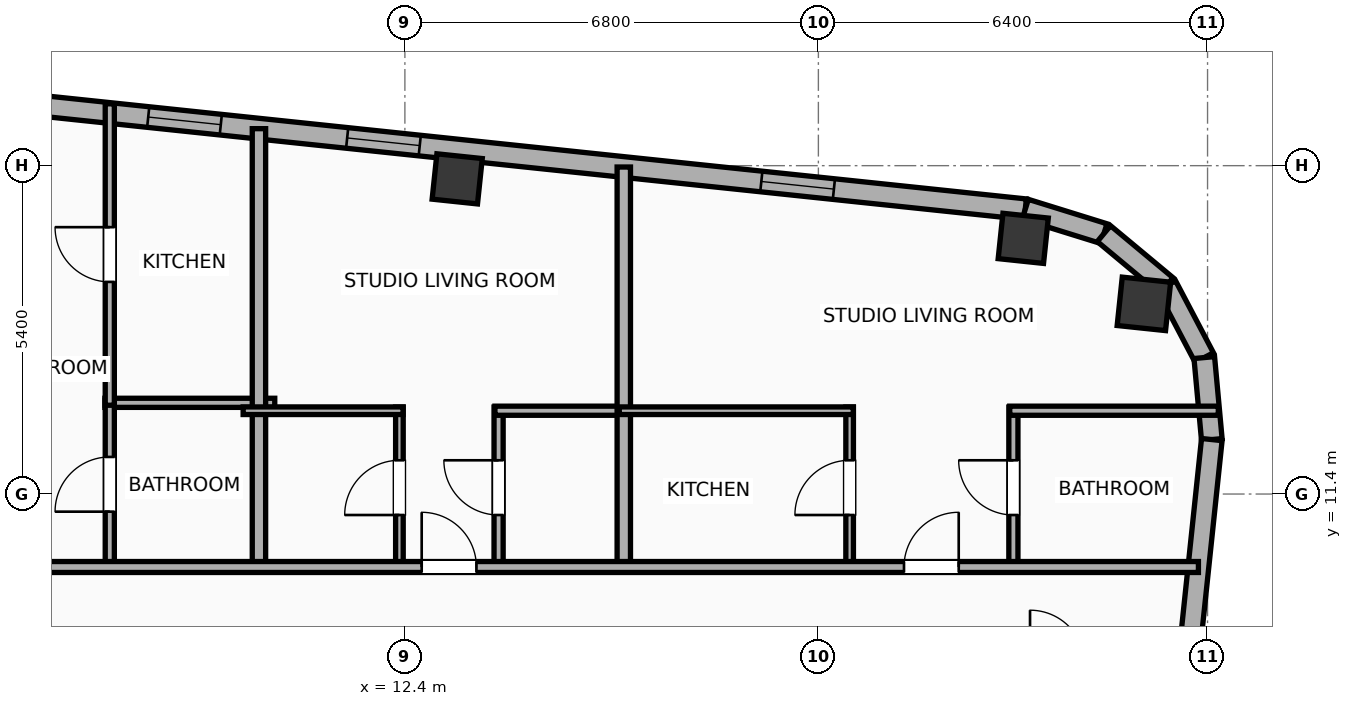
"""IFC4 building model, lengths in metres.
Left out: names, types, materials, properties, quantities, classifications, styles, units other than length and angle.
Written with IfcOpenShell. Run it as: python <this file> out.ifc"""

import sys

from ifc_helpers import new_model, si_unit, direction, frame, frame_2d, origin, origin_2d, place, context, subcontext, project, spatial, rectangle, hollow_rectangle, hollow_circle, extrude, element, fill, save


model = new_model("IFC4")
c1 = context("Model", 3, precision=1e-05, world=origin(), true_north=direction((0.0, 1.0)))
c2 = subcontext(c1, "Body", "Model", "MODEL_VIEW")
j1 = project(units=[si_unit("LENGTHUNIT", "METRE"), si_unit("PLANEANGLEUNIT", "RADIAN")], contexts=[c1])
p1 = place(None, origin())
s1 = spatial("IfcSite", under=j1, at=p1, CompositionType="ELEMENT")
p2 = place(p1, origin())
s2 = spatial("IfcBuilding", under=s1, at=p2, CompositionType="ELEMENT")
p3 = place(p2, frame((0.0, 0.0, 295.1)))
s3 = spatial("IfcBuildingStorey", under=s2, at=p3, CompositionType="ELEMENT", Elevation=295.1)
p4 = place(p3, frame((24.553, 14.527, 0.0), z_axis=(0.0, 0.0, 1.0), x_axis=(0.994521895368, -0.104528463268, 0.0)))
e1 = element("IfcColumn", 1, at=p4, inside=s3, PredefinedType="COLUMN", context=c2, shape_type="SweptSolid", body=[
    extrude(hollow_circle(Radius=0.4, WallThickness=0.028, at=origin_2d()), origin(), (0.0, 0.0, 1.0), 3.9),
])
for number, where, z_axis, x_axis in (
    (2, (22.569, 15.604, 0.0), (0.0, 0.0, 1.0), (0.995, -0.105, 0.0)),
    (3, (13.26, 16.583, 0.0), (0.0, 0.0, 1.0), (0.995, -0.105, 0.0)),
):
    element("IfcColumn", number, at=place(p3, frame(where, z_axis=z_axis, x_axis=x_axis)), inside=s3, PredefinedType="COLUMN", context=c2, shape_type="SweptSolid", body=[
        extrude(hollow_rectangle(XDim=0.75, YDim=0.75, WallThickness=0.025, at=origin_2d()), origin(), (0.0, 0.0, 1.0), 3.9),
    ])
p5 = place(p3, frame((-23.908, 20.972, 0.0), z_axis=(0.0, 0.0, 1.0), x_axis=(0.994521888554, -0.104528528102, 0.0)))
e4 = element("IfcWall", 4, at=p5, inside=s3, PredefinedType="ELEMENTEDWALL", context=c2, shape_type="SweptSolid", body=[
    extrude(rectangle(XDim=46.766, YDim=0.34, at=frame_2d((23.383, 0.0))), origin(), (0.0, 0.0, 1.0), 3.635),
])
p6 = place(p5, frame((22.933, 0.0, 0.65)))
e5 = element("IfcOpeningElement", 5, at=p6, cuts=e4, PredefinedType="OPENING", context=c2, shape_type="SweptSolid", body=[
    extrude(rectangle(XDim=2.6, YDim=2.45, at=frame_2d((1.3, 1.225))), frame((0.0, 0.18, 0.0), z_axis=(0.0, -1.0, 0.0), x_axis=(1.0, 0.0, 0.0)), (0.0, 0.0, 1.0), 0.36),
])
p7 = place(p5, frame((1.812, 0.0, 0.75)))
e6 = element("IfcOpeningElement", 6, at=p7, cuts=e4, PredefinedType="OPENING", context=c2, shape_type="SweptSolid", body=[
    extrude(rectangle(XDim=1.2, YDim=2.05, at=frame_2d((0.6, 1.025))), frame((0.0, 0.18, 0.0), z_axis=(0.0, -1.0, 0.0), x_axis=(1.0, 0.0, 0.0)), (0.0, 0.0, 1.0), 0.36),
])
p8 = place(p5, frame((7.481, 0.0, 0.75)))
e7 = element("IfcOpeningElement", 7, at=p8, cuts=e4, PredefinedType="OPENING", context=c2, shape_type="SweptSolid", body=[
    extrude(rectangle(XDim=1.2, YDim=2.05, at=frame_2d((0.6, 1.025))), frame((0.0, 0.18, 0.0), z_axis=(0.0, -1.0, 0.0), x_axis=(1.0, 0.0, 0.0)), (0.0, 0.0, 1.0), 0.36),
])
p9 = place(p5, frame((4.464, 0.0, 0.75)))
e8 = element("IfcOpeningElement", 8, at=p9, cuts=e4, PredefinedType="OPENING", context=c2, shape_type="SweptSolid", body=[
    extrude(rectangle(XDim=1.2, YDim=2.05, at=frame_2d((0.6, 1.025))), frame((0.0, 0.18, 0.0), z_axis=(0.0, -1.0, 0.0), x_axis=(1.0, 0.0, 0.0)), (0.0, 0.0, 1.0), 0.36),
])
p10 = place(p5, frame((13.665, 0.0, 0.75)))
e9 = element("IfcOpeningElement", 9, at=p10, cuts=e4, PredefinedType="OPENING", context=c2, shape_type="SweptSolid", body=[
    extrude(rectangle(XDim=1.2, YDim=2.05, at=frame_2d((0.6, 1.025))), frame((0.0, 0.18, 0.0), z_axis=(0.0, -1.0, 0.0), x_axis=(1.0, 0.0, 0.0)), (0.0, 0.0, 1.0), 0.36),
])
p11 = place(p5, frame((10.648, 0.0, 0.75)))
e10 = element("IfcOpeningElement", 10, at=p11, cuts=e4, PredefinedType="OPENING", context=c2, shape_type="SweptSolid", body=[
    extrude(rectangle(XDim=1.2, YDim=2.05, at=frame_2d((0.6, 1.025))), frame((0.0, 0.18, 0.0), z_axis=(0.0, -1.0, 0.0), x_axis=(1.0, 0.0, 0.0)), (0.0, 0.0, 1.0), 0.36),
])
p12 = place(p5, frame((19.254, 0.0, 0.75)))
e11 = element("IfcOpeningElement", 11, at=p12, cuts=e4, PredefinedType="OPENING", context=c2, shape_type="SweptSolid", body=[
    extrude(rectangle(XDim=1.2, YDim=2.05, at=frame_2d((0.6, 1.025))), frame((0.0, 0.18, 0.0), z_axis=(0.0, -1.0, 0.0), x_axis=(1.0, 0.0, 0.0)), (0.0, 0.0, 1.0), 0.36),
])
p13 = place(p5, frame((29.247, 0.0, 0.75)))
e12 = element("IfcOpeningElement", 12, at=p13, cuts=e4, PredefinedType="OPENING", context=c2, shape_type="SweptSolid", body=[
    extrude(rectangle(XDim=1.2, YDim=2.05, at=frame_2d((0.6, 1.025))), frame((0.0, 0.18, 0.0), z_axis=(0.0, -1.0, 0.0), x_axis=(1.0, 0.0, 0.0)), (0.0, 0.0, 1.0), 0.36),
])
p14 = place(p5, frame((32.264, 0.0, 0.75)))
e13 = element("IfcOpeningElement", 13, at=p14, cuts=e4, PredefinedType="OPENING", context=c2, shape_type="SweptSolid", body=[
    extrude(rectangle(XDim=1.2, YDim=2.05, at=frame_2d((0.6, 1.025))), frame((0.0, 0.18, 0.0), z_axis=(0.0, -1.0, 0.0), x_axis=(1.0, 0.0, 0.0)), (0.0, 0.0, 1.0), 0.36),
])
p15 = place(p5, frame((35.553, 0.0, 0.75)))
e14 = element("IfcOpeningElement", 14, at=p15, cuts=e4, PredefinedType="OPENING", context=c2, shape_type="SweptSolid", body=[
    extrude(rectangle(XDim=1.2, YDim=2.05, at=frame_2d((0.6, 1.025))), frame((0.0, 0.18, 0.0), z_axis=(0.0, -1.0, 0.0), x_axis=(1.0, 0.0, 0.0)), (0.0, 0.0, 1.0), 0.36),
])
p16 = place(p5, frame((42.402, 0.0, 0.75)))
e15 = element("IfcOpeningElement", 15, at=p16, cuts=e4, PredefinedType="OPENING", context=c2, shape_type="SweptSolid", body=[
    extrude(rectangle(XDim=1.2, YDim=2.05, at=frame_2d((0.6, 1.025))), frame((0.0, 0.18, 0.0), z_axis=(0.0, -1.0, 0.0), x_axis=(1.0, 0.0, 0.0)), (0.0, 0.0, 1.0), 0.36),
])
p17 = place(p3, frame((22.603, 16.084, 0.0), z_axis=(0.0, 0.0, 1.0), x_axis=(0.955007802701, -0.296580674994, 0.0)))
e16 = element("IfcWall", 16, at=p17, inside=s3, PredefinedType="ELEMENTEDWALL", context=c2, shape_type="SweptSolid", body=[
    extrude(rectangle(XDim=1.354, YDim=0.34, at=frame_2d((0.677, 0.0))), origin(), (0.0, 0.0, 1.0), 3.635),
])
for number, where, z_axis, x_axis in (
    (17, (23.896, 15.682, 0.0), (0.0, 0.0, 1.0), (0.769, -0.64, 0.0)),
    (18, (24.924, 14.827, 0.0), (0.0, 0.0, 1.0), (0.466, -0.885, 0.0)),
):
    element("IfcWall", number, at=place(p3, frame(where, z_axis=z_axis, x_axis=x_axis)), inside=s3, PredefinedType="ELEMENTEDWALL", context=c2, shape_type="SweptSolid", body=[
        extrude(rectangle(XDim=1.337, YDim=0.34, at=frame_2d((0.668, 0.0))), origin(), (0.0, 0.0, 1.0), 3.635),
    ])
p18 = place(p3, frame((25.546, 13.644, 0.0), z_axis=(0.0, 0.0, 1.0), x_axis=(0.091592370975, -0.995796584438, 0.0)))
e19 = element("IfcWall", 19, at=p18, inside=s3, PredefinedType="ELEMENTEDWALL", context=c2, shape_type="SweptSolid", body=[
    extrude(rectangle(XDim=1.354, YDim=0.34, at=frame_2d((0.677, 0.0))), origin(), (0.0, 0.0, 1.0), 3.635),
])
p19 = place(p3, frame((25.67, 12.296, 0.0), z_axis=(0.0, 0.0, 1.0), x_axis=(-0.104533282919, -0.994521388791, 0.0)))
e20 = element("IfcWall", 20, at=p19, inside=s3, PredefinedType="ELEMENTEDWALL", context=c2, shape_type="SweptSolid", body=[
    extrude(rectangle(XDim=30.366, YDim=0.34, at=frame_2d((15.183, 0.0))), origin(), (0.0, 0.0, 1.0), 3.635),
])
p20 = place(p19, frame((5.442, 0.0, 0.65)))
e21 = element("IfcOpeningElement", 21, at=p20, cuts=e20, PredefinedType="OPENING", context=c2, shape_type="SweptSolid", body=[
    extrude(rectangle(XDim=2.6, YDim=2.45, at=frame_2d((1.3, 1.225))), frame((0.0, 0.18, 0.0), z_axis=(0.0, -1.0, 0.0), x_axis=(1.0, 0.0, 0.0)), (0.0, 0.0, 1.0), 0.36),
])
p21 = place(p19, frame((27.067, 0.0, 0.75)))
e22 = element("IfcOpeningElement", 22, at=p21, cuts=e20, PredefinedType="OPENING", context=c2, shape_type="SweptSolid", body=[
    extrude(rectangle(XDim=1.2, YDim=2.05, at=frame_2d((0.6, 1.025))), frame((0.0, 0.18, 0.0), z_axis=(0.0, -1.0, 0.0), x_axis=(1.0, 0.0, 0.0)), (0.0, 0.0, 1.0), 0.36),
])
p22 = place(p19, frame((17.879, 0.0, 0.75)))
e23 = element("IfcOpeningElement", 23, at=p22, cuts=e20, PredefinedType="OPENING", context=c2, shape_type="SweptSolid", body=[
    extrude(rectangle(XDim=1.2, YDim=2.05, at=frame_2d((0.6, 1.025))), frame((0.0, 0.18, 0.0), z_axis=(0.0, -1.0, 0.0), x_axis=(1.0, 0.0, 0.0)), (0.0, 0.0, 1.0), 0.36),
])
p23 = place(p3, frame((7.467, 12.9, 0.0), z_axis=(0.0, 0.0, 1.0), x_axis=(1.0, 0.0, 0.0)))
e24 = element("IfcWall", 24, at=p23, inside=s3, PredefinedType="PLUMBINGWALL", context=c2, shape_type="SweptSolid", body=[
    extrude(rectangle(XDim=2.793, YDim=0.15, at=frame_2d((1.396, 0.0))), origin(), (0.0, 0.0, 1.0), 3.635),
])
p24 = place(p3, frame((7.547, 10.18, 0.0), z_axis=(0.0, 0.0, 1.0), x_axis=(0.0, 1.0, 0.0)))
e25 = element("IfcWall", 25, at=p24, inside=s3, PredefinedType="PLUMBINGWALL", context=c2, shape_type="SweptSolid", body=[
    extrude(rectangle(XDim=2.76, YDim=0.15, at=frame_2d((1.38, 0.0))), origin(), (0.0, 0.0, 1.0), 3.635),
])
p25 = place(p24, frame((0.93, 0.0, 0.0)))
e26 = element("IfcOpeningElement", 26, at=p25, cuts=e25, PredefinedType="OPENING", context=c2, shape_type="SweptSolid", body=[
    extrude(rectangle(XDim=0.9, YDim=2.05, at=frame_2d((0.45, 1.025))), frame((0.0, 0.085, 0.0), z_axis=(0.0, -1.0, 0.0), x_axis=(1.0, 0.0, 0.0)), (0.0, 0.0, 1.0), 0.17),
])
p26 = place(p3, frame((7.547, 12.86, 0.0), z_axis=(0.0, 0.0, 1.0), x_axis=(0.0, 1.0, 0.0)))
e27 = element("IfcWall", 27, at=p26, inside=s3, PredefinedType="PLUMBINGWALL", context=c2, shape_type="SweptSolid", body=[
    extrude(rectangle(XDim=4.957, YDim=0.15, at=frame_2d((2.479, 0.0))), origin(), (0.0, 0.0, 1.0), 3.635),
])
p27 = place(p26, frame((2.029, 0.0, 0.0)))
e28 = element("IfcOpeningElement", 28, at=p27, cuts=e27, PredefinedType="OPENING", context=c2, shape_type="SweptSolid", body=[
    extrude(rectangle(XDim=0.9, YDim=2.05, at=frame_2d((0.45, 1.025))), frame((0.0, 0.085, 0.0), z_axis=(0.0, -1.0, 0.0), x_axis=(1.0, 0.0, 0.0)), (0.0, 0.0, 1.0), 0.17),
])
p28 = place(p3, frame((10.0, 10.12, 0.0), z_axis=(0.0, 0.0, 1.0), x_axis=(0.0, 1.0, 0.0)))
e29 = element("IfcWall", 29, at=p28, inside=s3, PredefinedType="PARTITIONING", context=c2, shape_type="SweptSolid", body=[
    extrude(rectangle(XDim=7.288, YDim=0.22, at=frame_2d((3.644, 0.0))), origin(), (0.0, 0.0, 1.0), 3.635),
])
p29 = place(p3, frame((12.31, 10.18, 0.0), z_axis=(0.0, 0.0, 1.0), x_axis=(0.0, 1.0, 0.0)))
e30 = element("IfcWall", 30, at=p29, inside=s3, PredefinedType="PARTITIONING", context=c2, shape_type="SweptSolid", body=[
    extrude(rectangle(XDim=2.65, YDim=0.125, at=frame_2d((1.325, 0.0))), origin(), (0.0, 0.0, 1.0), 3.635),
])
p30 = place(p29, frame((0.875, 0.0, 0.0)))
e31 = element("IfcOpeningElement", 31, at=p30, cuts=e30, PredefinedType="OPENING", context=c2, shape_type="SweptSolid", body=[
    extrude(rectangle(XDim=0.9, YDim=2.05, at=frame_2d((0.45, 1.025))), frame((0.0, 0.073, 0.0), z_axis=(0.0, -1.0, 0.0), x_axis=(1.0, 0.0, 0.0)), (0.0, 0.0, 1.0), 0.145),
])
p31 = place(p3, frame((13.941, 10.18, 0.0), z_axis=(0.0, 0.0, 1.0), x_axis=(0.0, 1.0, 0.0)))
e32 = element("IfcWall", 32, at=p31, inside=s3, PredefinedType="PLUMBINGWALL", context=c2, shape_type="SweptSolid", body=[
    extrude(rectangle(XDim=2.65, YDim=0.15, at=frame_2d((1.325, 0.0))), origin(), (0.0, 0.0, 1.0), 3.635),
])
p32 = place(p31, frame((0.875, 0.0, 0.0)))
e33 = element("IfcOpeningElement", 33, at=p32, cuts=e32, PredefinedType="OPENING", context=c2, shape_type="SweptSolid", body=[
    extrude(rectangle(XDim=0.9, YDim=2.05, at=frame_2d((0.45, 1.025))), frame((0.0, 0.085, 0.0), z_axis=(0.0, -1.0, 0.0), x_axis=(1.0, 0.0, 0.0)), (0.0, 0.0, 1.0), 0.17),
])
p33 = place(p3, frame((9.74, 12.77, 0.0), z_axis=(0.0, 0.0, 1.0), x_axis=(1.0, 0.0, 0.0)))
e34 = element("IfcWall", 34, at=p33, inside=s3, PredefinedType="PARTITIONING", context=c2, shape_type="SweptSolid", body=[
    extrude(rectangle(XDim=2.63, YDim=0.125, at=frame_2d((1.315, 0.0))), origin(), (0.0, 0.0, 1.0), 3.635),
])
p34 = place(p3, frame((13.881, 12.77, 0.0), z_axis=(0.0, 0.0, 1.0), x_axis=(1.0, 0.0, 0.0)))
e35 = element("IfcWall", 35, at=p34, inside=s3, PredefinedType="PLUMBINGWALL", context=c2, shape_type="SweptSolid", body=[
    extrude(rectangle(XDim=2.194, YDim=0.15, at=frame_2d((1.097, 0.0))), origin(), (0.0, 0.0, 1.0), 3.635),
])
p35 = place(p3, frame((16.0, 10.12, 0.0), z_axis=(0.0, 0.0, 1.0), x_axis=(0.0, 1.0, 0.0)))
e36 = element("IfcWall", 36, at=p35, inside=s3, PredefinedType="PARTITIONING", context=c2, shape_type="SweptSolid", body=[
    extrude(rectangle(XDim=6.657, YDim=0.22, at=frame_2d((3.329, 0.0))), origin(), (0.0, 0.0, 1.0), 3.635),
])
p36 = place(p3, frame((19.714, 10.18, 0.0), z_axis=(0.0, 0.0, 1.0), x_axis=(0.0, 1.0, 0.0)))
e37 = element("IfcWall", 37, at=p36, inside=s3, PredefinedType="PARTITIONING", context=c2, shape_type="SweptSolid", body=[
    extrude(rectangle(XDim=2.65, YDim=0.125, at=frame_2d((1.325, 0.0))), origin(), (0.0, 0.0, 1.0), 3.635),
])
p37 = place(p36, frame((0.875, 0.0, 0.0)))
e38 = element("IfcOpeningElement", 38, at=p37, cuts=e37, PredefinedType="OPENING", context=c2, shape_type="SweptSolid", body=[
    extrude(rectangle(XDim=0.9, YDim=2.05, at=frame_2d((0.45, 1.025))), frame((0.0, 0.073, 0.0), z_axis=(0.0, -1.0, 0.0), x_axis=(1.0, 0.0, 0.0)), (0.0, 0.0, 1.0), 0.145),
])
p38 = place(p3, frame((22.407, 10.18, 0.0), z_axis=(0.0, 0.0, 1.0), x_axis=(0.0, 1.0, 0.0)))
e39 = element("IfcWall", 39, at=p38, inside=s3, PredefinedType="PLUMBINGWALL", context=c2, shape_type="SweptSolid", body=[
    extrude(rectangle(XDim=2.65, YDim=0.15, at=frame_2d((1.325, 0.0))), origin(), (0.0, 0.0, 1.0), 3.635),
])
p39 = place(p38, frame((0.875, 0.0, 0.0)))
e40 = element("IfcOpeningElement", 40, at=p39, cuts=e39, PredefinedType="OPENING", context=c2, shape_type="SweptSolid", body=[
    extrude(rectangle(XDim=0.9, YDim=2.05, at=frame_2d((0.45, 1.025))), frame((0.0, 0.085, 0.0), z_axis=(0.0, -1.0, 0.0), x_axis=(1.0, 0.0, 0.0)), (0.0, 0.0, 1.0), 0.17),
])
p40 = place(p3, frame((15.925, 12.77, 0.0), z_axis=(0.0, 0.0, 1.0), x_axis=(1.0, 0.0, 0.0)))
e41 = element("IfcWall", 41, at=p40, inside=s3, PredefinedType="PARTITIONING", context=c2, shape_type="SweptSolid", body=[
    extrude(rectangle(XDim=3.849, YDim=0.125, at=frame_2d((1.924, 0.0))), origin(), (0.0, 0.0, 1.0), 3.635),
])
p41 = place(p3, frame((22.347, 12.77, 0.0), z_axis=(0.0, 0.0, 1.0), x_axis=(1.0, 0.0, 0.0)))
e42 = element("IfcWall", 42, at=p41, inside=s3, PredefinedType="PLUMBINGWALL", context=c2, shape_type="SweptSolid", body=[
    extrude(rectangle(XDim=3.43, YDim=0.15, at=frame_2d((1.715, 0.0))), origin(), (0.0, 0.0, 1.0), 3.635),
])
p42 = place(p3, frame((-28.506, 10.2, 0.0), z_axis=(0.0, 0.0, 1.0), x_axis=(1.0, 0.0, 0.0)))
e43 = element("IfcWall", 43, at=p42, inside=s3, PredefinedType="PARTITIONING", context=c2, shape_type="SweptSolid", body=[
    extrude(rectangle(XDim=53.956, YDim=0.18, at=frame_2d((26.978, 0.0))), origin(), (0.0, 0.0, 1.0), 3.635),
])
p43 = place(p42, frame((3.828, 0.0, 0.0)))
e44 = element("IfcOpeningElement", 44, at=p43, cuts=e43, PredefinedType="OPENING", context=c2, shape_type="SweptSolid", body=[
    extrude(rectangle(XDim=1.15, YDim=2.05, at=frame_2d((0.575, 1.025))), frame((0.0, 0.1, 0.0), z_axis=(0.0, -1.0, 0.0), x_axis=(1.0, 0.0, 0.0)), (0.0, 0.0, 1.0), 0.2),
])
p44 = place(p42, frame((12.029, 0.0, 0.0)))
e45 = element("IfcOpeningElement", 45, at=p44, cuts=e43, PredefinedType="OPENING", context=c2, shape_type="SweptSolid", body=[
    extrude(rectangle(XDim=1.15, YDim=2.05, at=frame_2d((0.575, 1.025))), frame((0.0, 0.1, 0.0), z_axis=(0.0, -1.0, 0.0), x_axis=(1.0, 0.0, 0.0)), (0.0, 0.0, 1.0), 0.2),
])
p45 = place(p42, frame((18.175, 0.0, 0.0)))
e46 = element("IfcOpeningElement", 46, at=p45, cuts=e43, PredefinedType="OPENING", context=c2, shape_type="SweptSolid", body=[
    extrude(rectangle(XDim=1.15, YDim=2.05, at=frame_2d((0.575, 1.025))), frame((0.0, 0.1, 0.0), z_axis=(0.0, -1.0, 0.0), x_axis=(1.0, 0.0, 0.0)), (0.0, 0.0, 1.0), 0.2),
])
p46 = place(p42, frame((23.183, 0.0, 0.0)))
e47 = element("IfcOpeningElement", 47, at=p46, cuts=e43, PredefinedType="OPENING", context=c2, shape_type="SweptSolid", body=[
    extrude(rectangle(XDim=0.9, YDim=2.05, at=frame_2d((0.45, 1.025))), frame((0.0, 0.1, 0.0), z_axis=(0.0, -1.0, 0.0), x_axis=(1.0, 0.0, 0.0)), (0.0, 0.0, 1.0), 0.2),
])
p47 = place(p42, frame((29.182, 0.0, 0.0)))
e48 = element("IfcOpeningElement", 48, at=p47, cuts=e43, PredefinedType="OPENING", context=c2, shape_type="SweptSolid", body=[
    extrude(rectangle(XDim=0.9, YDim=2.05, at=frame_2d((0.45, 1.025))), frame((0.0, 0.1, 0.0), z_axis=(0.0, -1.0, 0.0), x_axis=(1.0, 0.0, 0.0)), (0.0, 0.0, 1.0), 0.2),
])
p48 = place(p42, frame((33.735, 0.0, 0.0)))
e49 = element("IfcOpeningElement", 49, at=p48, cuts=e43, PredefinedType="OPENING", context=c2, shape_type="SweptSolid", body=[
    extrude(rectangle(XDim=1.15, YDim=2.05, at=frame_2d((0.575, 1.025))), frame((0.0, 0.1, 0.0), z_axis=(0.0, -1.0, 0.0), x_axis=(1.0, 0.0, 0.0)), (0.0, 0.0, 1.0), 0.2),
])
p49 = place(p42, frame((41.182, 0.0, 0.0)))
e50 = element("IfcOpeningElement", 50, at=p49, cuts=e43, PredefinedType="OPENING", context=c2, shape_type="SweptSolid", body=[
    extrude(rectangle(XDim=0.9, YDim=2.05, at=frame_2d((0.45, 1.025))), frame((0.0, 0.1, 0.0), z_axis=(0.0, -1.0, 0.0), x_axis=(1.0, 0.0, 0.0)), (0.0, 0.0, 1.0), 0.2),
])
p50 = place(p42, frame((49.114, 0.0, 0.0)))
e51 = element("IfcOpeningElement", 51, at=p50, cuts=e43, PredefinedType="OPENING", context=c2, shape_type="SweptSolid", body=[
    extrude(rectangle(XDim=0.9, YDim=2.05, at=frame_2d((0.45, 1.025))), frame((0.0, 0.1, 0.0), z_axis=(0.0, -1.0, 0.0), x_axis=(1.0, 0.0, 0.0)), (0.0, 0.0, 1.0), 0.2),
])
p51 = place(p14, origin())
e52 = element("IfcWindow", 52, at=p51, inside=s3, PartitioningType="SINGLE_PANEL", PredefinedType="WINDOW", context=c2, shape_type="SweptSolid", body=[
    extrude(rectangle(XDim=1.2, YDim=2.05, at=frame_2d((0.6, 1.025))), frame((0.0, 0.03, 0.0), z_axis=(0.0, -1.0, 0.0), x_axis=(1.0, 0.0, 0.0)), (0.0, 0.0, 1.0), 0.06),
])
fill(e13, e52)
p52 = place(p15, origin())
e53 = element("IfcWindow", 53, at=p52, inside=s3, PartitioningType="SINGLE_PANEL", PredefinedType="WINDOW", context=c2, shape_type="SweptSolid", body=[
    extrude(rectangle(XDim=1.2, YDim=2.05, at=frame_2d((0.6, 1.025))), frame((0.0, 0.03, 0.0), z_axis=(0.0, -1.0, 0.0), x_axis=(1.0, 0.0, 0.0)), (0.0, 0.0, 1.0), 0.06),
])
fill(e14, e53)
p53 = place(p16, origin())
e54 = element("IfcWindow", 54, at=p53, inside=s3, PartitioningType="SINGLE_PANEL", PredefinedType="WINDOW", context=c2, shape_type="SweptSolid", body=[
    extrude(rectangle(XDim=1.2, YDim=2.05, at=frame_2d((0.6, 1.025))), frame((0.0, 0.03, 0.0), z_axis=(0.0, -1.0, 0.0), x_axis=(1.0, 0.0, 0.0)), (0.0, 0.0, 1.0), 0.06),
])
fill(e15, e54)
p54 = place(p25, origin())
e55 = element("IfcDoor", 55, at=p54, inside=s3, OperationType="SINGLE_SWING_LEFT", PredefinedType="DOOR", context=c2, shape_type="SweptSolid", body=[
    extrude(rectangle(XDim=0.9, YDim=2.05, at=frame_2d((0.45, 1.025))), frame((0.0, 0.025, 0.0), z_axis=(0.0, -1.0, 0.0), x_axis=(1.0, 0.0, 0.0)), (0.0, 0.0, 1.0), 0.05),
])
fill(e26, e55)
p55 = place(p27, origin())
e56 = element("IfcDoor", 56, at=p55, inside=s3, OperationType="SINGLE_SWING_RIGHT", PredefinedType="DOOR", context=c2, shape_type="SweptSolid", body=[
    extrude(rectangle(XDim=0.9, YDim=2.05, at=frame_2d((0.45, 1.025))), frame((0.0, 0.025, 0.0), z_axis=(0.0, -1.0, 0.0), x_axis=(1.0, 0.0, 0.0)), (0.0, 0.0, 1.0), 0.05),
])
fill(e28, e56)
p56 = place(p30, origin())
e57 = element("IfcDoor", 57, at=p56, inside=s3, OperationType="SINGLE_SWING_LEFT", PredefinedType="DOOR", context=c2, shape_type="SweptSolid", body=[
    extrude(rectangle(XDim=0.9, YDim=2.05, at=frame_2d((0.45, 1.025))), frame((0.0, 0.025, 0.0), z_axis=(0.0, -1.0, 0.0), x_axis=(1.0, 0.0, 0.0)), (0.0, 0.0, 1.0), 0.05),
])
fill(e31, e57)
p57 = place(p32, origin())
e58 = element("IfcDoor", 58, at=p57, inside=s3, OperationType="SINGLE_SWING_RIGHT", PredefinedType="DOOR", context=c2, shape_type="SweptSolid", body=[
    extrude(rectangle(XDim=0.9, YDim=2.05, at=frame_2d((0.45, 1.025))), frame((0.0, 0.025, 0.0), z_axis=(0.0, -1.0, 0.0), x_axis=(1.0, 0.0, 0.0)), (0.0, 0.0, 1.0), 0.05),
])
fill(e33, e58)
p58 = place(p37, origin())
e59 = element("IfcDoor", 59, at=p58, inside=s3, OperationType="SINGLE_SWING_LEFT", PredefinedType="DOOR", context=c2, shape_type="SweptSolid", body=[
    extrude(rectangle(XDim=0.9, YDim=2.05, at=frame_2d((0.45, 1.025))), frame((0.0, 0.025, 0.0), z_axis=(0.0, -1.0, 0.0), x_axis=(1.0, 0.0, 0.0)), (0.0, 0.0, 1.0), 0.05),
])
fill(e38, e59)
p59 = place(p39, origin())
e60 = element("IfcDoor", 60, at=p59, inside=s3, OperationType="SINGLE_SWING_RIGHT", PredefinedType="DOOR", context=c2, shape_type="SweptSolid", body=[
    extrude(rectangle(XDim=0.9, YDim=2.05, at=frame_2d((0.45, 1.025))), frame((0.0, 0.025, 0.0), z_axis=(0.0, -1.0, 0.0), x_axis=(1.0, 0.0, 0.0)), (0.0, 0.0, 1.0), 0.05),
])
fill(e40, e60)
p60 = place(p49, origin())
e61 = element("IfcDoor", 61, at=p60, inside=s3, OperationType="SINGLE_SWING_LEFT", PredefinedType="DOOR", context=c2, shape_type="SweptSolid", body=[
    extrude(rectangle(XDim=0.9, YDim=2.05, at=frame_2d((0.45, 1.025))), frame((0.0, 0.025, 0.0), z_axis=(0.0, -1.0, 0.0), x_axis=(1.0, 0.0, 0.0)), (0.0, 0.0, 1.0), 0.05),
])
fill(e50, e61)
p61 = place(p50, origin())
e62 = element("IfcDoor", 62, at=p61, inside=s3, OperationType="SINGLE_SWING_RIGHT", PredefinedType="DOOR", context=c2, shape_type="SweptSolid", body=[
    extrude(rectangle(XDim=0.9, YDim=2.05, at=frame_2d((0.45, 1.025))), frame((0.0, 0.025, 0.0), z_axis=(0.0, -1.0, 0.0), x_axis=(1.0, 0.0, 0.0)), (0.0, 0.0, 1.0), 0.05),
])
fill(e51, e62)
save(model, sys.argv[1])
